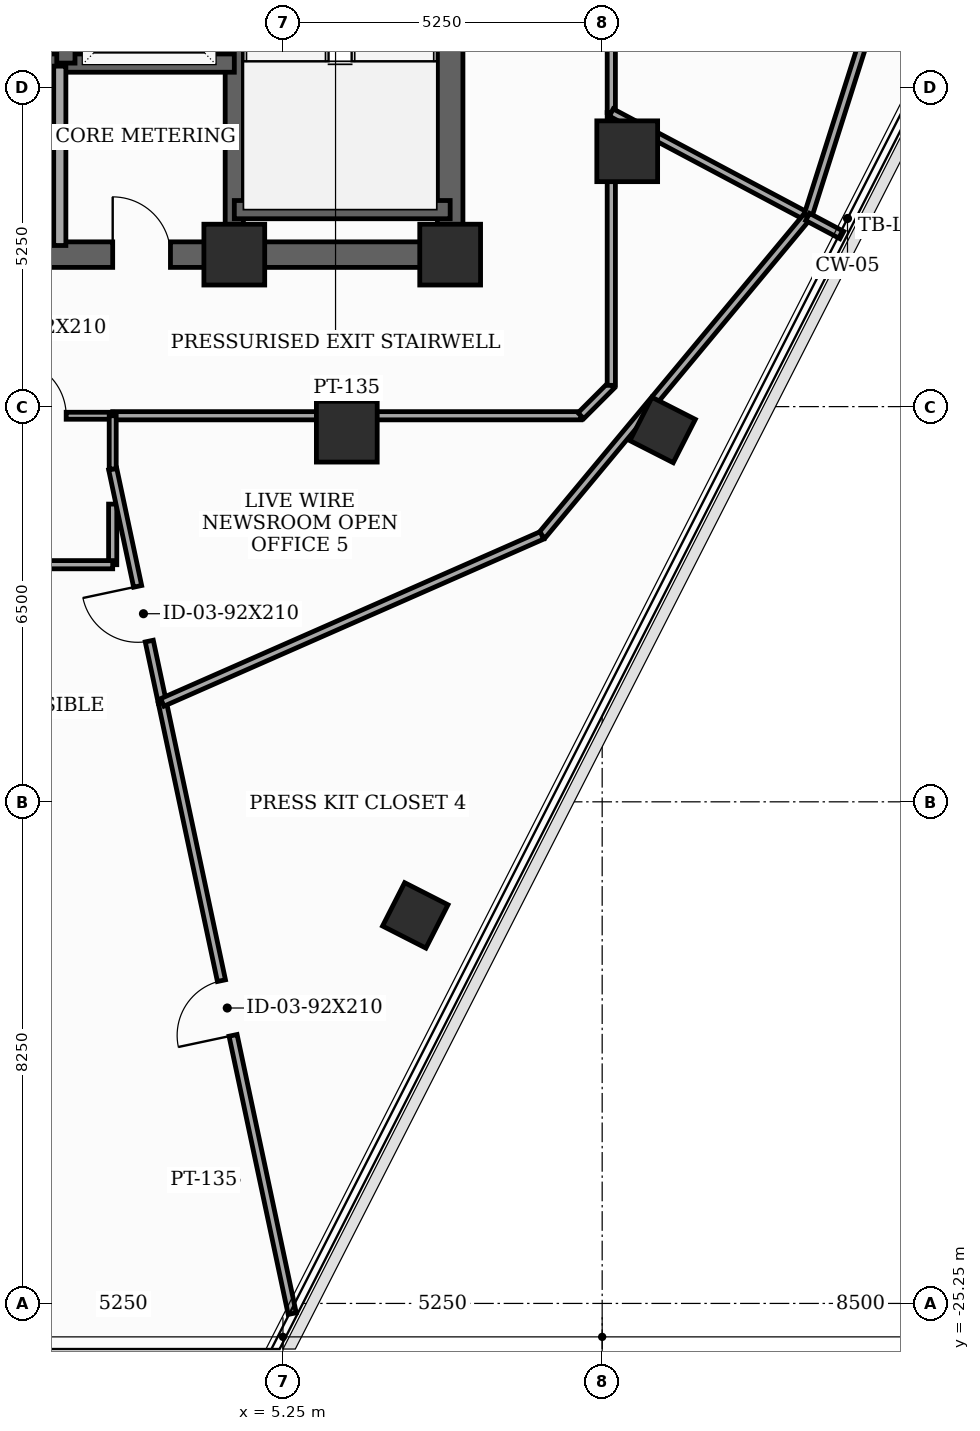
"""IFC4 building model, lengths in metres.
Left out: names, types, materials, properties, quantities, classifications, styles, units other than length and angle.
Written with IfcOpenShell. Run it as: python <this file> out.ifc"""

import sys

from ifc_helpers import new_model, si_unit, direction, frame, frame_2d, origin, origin_2d, place, context, subcontext, project, spatial, rectangle, extrude, element, fill, save


model = new_model("IFC4")
c1 = context("Model", 3, precision=1e-05, world=origin(), true_north=direction((0.0, 1.0)))
c2 = subcontext(c1, "Body", "Model", "MODEL_VIEW")
j1 = project(units=[si_unit("LENGTHUNIT", "METRE"), si_unit("PLANEANGLEUNIT", "RADIAN")], contexts=[c1])
p1 = place(None, origin())
s1 = spatial("IfcSite", under=j1, at=p1, CompositionType="ELEMENT")
p2 = place(p1, origin())
s2 = spatial("IfcBuilding", under=s1, at=p2, CompositionType="ELEMENT")
p3 = place(p2, frame((0.0, 0.0, 267.0)))
s3 = spatial("IfcBuildingStorey", under=s2, at=p3, CompositionType="ELEMENT", Elevation=267.0)
for number, where, z_axis, x_axis in (
    (1, (4.45, -8.0, 0.0), (0.0, 0.0, 1.0), (1.0, 0.0, 0.0)),
    (2, (8.0, -8.0, 0.0), (0.0, 0.0, 1.0), (1.0, 0.0, 0.0)),
    (3, (6.3, -10.912, 0.0), (0.0, 0.0, 1.0), (1.0, 0.0, 0.0)),
    (4, (10.912, -6.3, 0.0), (0.0, 0.0, 1.0), (1.0, 0.0, 0.0)),
):
    element("IfcColumn", number, at=place(p3, frame(where, z_axis=z_axis, x_axis=x_axis)), inside=s3, PredefinedType="COLUMN", context=c2, shape_type="SweptSolid", body=[
        extrude(rectangle(XDim=1.0, YDim=1.0, at=origin_2d()), origin(), (0.0, 0.0, 1.0), 3.7),
    ])
for number, where, z_axis, x_axis in (
    (5, (7.426, -18.868, 0.0), (0.0, 0.0, 1.0), (0.454, 0.891, 0.0)),
    (6, (11.494, -10.885, 0.0), (0.0, 0.0, 1.0), (0.454, 0.891, 0.0)),
):
    element("IfcColumn", number, at=place(p3, frame(where, z_axis=z_axis, x_axis=x_axis)), inside=s3, PredefinedType="COLUMN", context=c2, shape_type="SweptSolid", body=[
        extrude(rectangle(XDim=0.8, YDim=0.8, at=origin_2d()), origin(), (0.0, 0.0, 1.0), 3.7),
    ])
p4 = place(p3, frame((8.0, -8.0, 0.0), z_axis=(0.0, 0.0, 1.0), x_axis=(0.0, 1.0, 0.0)))
e7 = element("IfcWall", 7, at=p4, inside=s3, PredefinedType="SHEAR", context=c2, shape_type="SweptSolid", body=[
    extrude(rectangle(XDim=16.0, YDim=0.42, at=frame_2d((8.0, 0.0))), origin(), (0.0, 0.0, 1.0), 3.5),
])
p5 = place(p4, frame((9.6, 0.0, 0.0)))
e8 = element("IfcOpeningElement", 8, at=p5, cuts=e7, PredefinedType="OPENING", context=c2, shape_type="SweptSolid", body=[
    extrude(rectangle(XDim=1.05, YDim=2.15, at=frame_2d((0.525, 1.075))), frame((0.0, 0.22, 0.0), z_axis=(0.0, -1.0, 0.0), x_axis=(1.0, 0.0, 0.0)), (0.0, 0.0, 1.0), 0.44),
])
p6 = place(p4, frame((14.469, 0.0, 0.0)))
e9 = element("IfcOpeningElement", 9, at=p6, cuts=e7, PredefinedType="OPENING", context=c2, shape_type="SweptSolid", body=[
    extrude(rectangle(XDim=0.85, YDim=2.02, at=frame_2d((0.425, 1.01))), frame((0.0, 0.22, 0.0), z_axis=(0.0, -1.0, 0.0), x_axis=(1.0, 0.0, 0.0)), (0.0, 0.0, 1.0), 0.44),
])
p7 = place(p3, frame((-8.0, -8.0, 0.0), z_axis=(0.0, 0.0, 1.0), x_axis=(1.0, 0.0, 0.0)))
e10 = element("IfcWall", 10, at=p7, inside=s3, PredefinedType="SHEAR", context=c2, shape_type="SweptSolid", body=[
    extrude(rectangle(XDim=16.0, YDim=0.42, at=frame_2d((8.0, 0.0))), origin(), (0.0, 0.0, 1.0), 3.5),
])
p8 = place(p7, frame((4.6, 0.0, 0.0)))
e11 = element("IfcOpeningElement", 11, at=p8, cuts=e10, PredefinedType="OPENING", context=c2, shape_type="SweptSolid", body=[
    extrude(rectangle(XDim=0.95, YDim=2.1, at=frame_2d((0.475, 1.05))), frame((0.0, 0.22, 0.0), z_axis=(0.0, -1.0, 0.0), x_axis=(1.0, 0.0, 0.0)), (0.0, 0.0, 1.0), 0.44),
])
p9 = place(p7, frame((7.52, 0.0, 0.0)))
e12 = element("IfcOpeningElement", 12, at=p9, cuts=e10, PredefinedType="OPENING", context=c2, shape_type="SweptSolid", body=[
    extrude(rectangle(XDim=0.95, YDim=2.1, at=frame_2d((0.475, 1.05))), frame((0.0, 0.22, 0.0), z_axis=(0.0, -1.0, 0.0), x_axis=(1.0, 0.0, 0.0)), (0.0, 0.0, 1.0), 0.44),
])
p10 = place(p7, frame((10.45, 0.0, 0.0)))
e13 = element("IfcOpeningElement", 13, at=p10, cuts=e10, PredefinedType="OPENING", context=c2, shape_type="SweptSolid", body=[
    extrude(rectangle(XDim=0.95, YDim=2.1, at=frame_2d((0.475, 1.05))), frame((0.0, 0.22, 0.0), z_axis=(0.0, -1.0, 0.0), x_axis=(1.0, 0.0, 0.0)), (0.0, 0.0, 1.0), 0.44),
])
p11 = place(p3, frame((4.45, -7.79, 0.0), z_axis=(0.0, 0.0, 1.0), x_axis=(0.0, 1.0, 0.0)))
e14 = element("IfcWall", 14, at=p11, inside=s3, PredefinedType="SHEAR", context=c2, shape_type="SweptSolid", body=[
    extrude(rectangle(XDim=15.58, YDim=0.3, at=frame_2d((7.79, 0.0))), origin(), (0.0, 0.0, 1.0), 3.5),
])
p12 = place(p3, frame((4.45, -7.26, 0.0), z_axis=(0.0, 0.0, 1.0), x_axis=(1.0, 0.0, 0.0)))
e15 = element("IfcWall", 15, at=p12, inside=s3, PredefinedType="SHEAR", context=c2, shape_type="SweptSolid", body=[
    extrude(rectangle(XDim=3.55, YDim=0.3, at=frame_2d((1.775, 0.0))), origin(), (0.0, 0.0, 1.0), 3.5),
])
p13 = place(p3, frame((-4.45, -4.85, 0.0), z_axis=(0.0, 0.0, 1.0), x_axis=(1.0, 0.0, 0.0)))
e16 = element("IfcWall", 16, at=p13, inside=s3, PredefinedType="SHEAR", context=c2, shape_type="SweptSolid", body=[
    extrude(rectangle(XDim=8.9, YDim=0.3, at=frame_2d((4.45, 0.0))), origin(), (0.0, 0.0, 1.0), 3.5),
])
p14 = place(p3, frame((1.68, -4.85, 0.0), z_axis=(0.0, 0.0, 1.0), x_axis=(0.0, 1.0, 0.0)))
e17 = element("IfcWall", 17, at=p14, inside=s3, PredefinedType="SHEAR", context=c2, shape_type="SweptSolid", body=[
    extrude(rectangle(XDim=12.64, YDim=0.3, at=frame_2d((6.32, 0.0))), origin(), (0.0, 0.0, 1.0), 3.5),
])
p15 = place(p14, frame((0.55, 0.0, 0.0)))
e18 = element("IfcOpeningElement", 18, at=p15, cuts=e17, PredefinedType="OPENING", context=c2, shape_type="SweptSolid", body=[
    extrude(rectangle(XDim=1.1, YDim=2.1, at=frame_2d((0.55, 1.05))), frame((0.0, 0.16, 0.0), z_axis=(0.0, -1.0, 0.0), x_axis=(1.0, 0.0, 0.0)), (0.0, 0.0, 1.0), 0.32),
])
p16 = place(p14, frame((2.65, 0.0, 0.0)))
e19 = element("IfcOpeningElement", 19, at=p16, cuts=e17, PredefinedType="OPENING", context=c2, shape_type="SweptSolid", body=[
    extrude(rectangle(XDim=1.1, YDim=2.1, at=frame_2d((0.55, 1.05))), frame((0.0, 0.16, 0.0), z_axis=(0.0, -1.0, 0.0), x_axis=(1.0, 0.0, 0.0)), (0.0, 0.0, 1.0), 0.32),
])
p17 = place(p14, frame((4.75, 0.0, 0.0)))
e20 = element("IfcOpeningElement", 20, at=p17, cuts=e17, PredefinedType="OPENING", context=c2, shape_type="SweptSolid", body=[
    extrude(rectangle(XDim=1.1, YDim=2.1, at=frame_2d((0.55, 1.05))), frame((0.0, 0.16, 0.0), z_axis=(0.0, -1.0, 0.0), x_axis=(1.0, 0.0, 0.0)), (0.0, 0.0, 1.0), 0.32),
])
p18 = place(p14, frame((8.9, 0.0, 0.0)))
e21 = element("IfcOpeningElement", 21, at=p18, cuts=e17, PredefinedType="OPENING", context=c2, shape_type="SweptSolid", body=[
    extrude(rectangle(XDim=0.95, YDim=2.1, at=frame_2d((0.475, 1.05))), frame((0.0, 0.16, 0.0), z_axis=(0.0, -1.0, 0.0), x_axis=(1.0, 0.0, 0.0)), (0.0, 0.0, 1.0), 0.32),
])
p19 = place(p3, frame((1.58, -7.85, 0.0), z_axis=(0.0, 0.0, 1.0), x_axis=(0.0, 1.0, 0.0)))
e22 = element("IfcWall", 22, at=p19, inside=s3, PredefinedType="SOLIDWALL", context=c2, shape_type="SweptSolid", body=[
    extrude(rectangle(XDim=2.95, YDim=0.2, at=frame_2d((1.475, 0.0))), origin(), (0.0, 0.0, 1.0), 2.885),
])
p20 = place(p3, frame((10.65, -5.663, 0.0), z_axis=(0.0, 0.0, 1.0), x_axis=(0.0, 1.0, 0.0)))
e23 = element("IfcWall", 23, at=p20, inside=s3, PredefinedType="PARTITIONING", context=c2, shape_type="SweptSolid", body=[
    extrude(rectangle(XDim=7.145, YDim=0.135, at=frame_2d((3.573, 0.0))), origin(), (0.0, 0.0, 1.0), 2.885),
])
p21 = place(p20, frame((3.097, 0.0, 0.0)))
e24 = element("IfcOpeningElement", 24, at=p21, cuts=e23, PredefinedType="OPENING", context=c2, shape_type="SweptSolid", body=[
    extrude(rectangle(XDim=0.95, YDim=2.1, at=frame_2d((0.475, 1.05))), frame((0.0, 0.077, 0.0), z_axis=(0.0, -1.0, 0.0), x_axis=(1.0, 0.0, 0.0)), (0.0, 0.0, 1.0), 0.155),
])
p22 = place(p3, frame((0.0, -10.65, 0.0), z_axis=(0.0, 0.0, 1.0), x_axis=(1.0, 0.0, 0.0)))
e25 = element("IfcWall", 25, at=p22, inside=s3, PredefinedType="PARTITIONING", context=c2, shape_type="SweptSolid", body=[
    extrude(rectangle(XDim=2.45, YDim=0.115, at=frame_2d((1.225, 0.0))), origin(), (0.0, 0.0, 1.0), 3.5),
])
p23 = place(p22, frame((0.765, 0.0, 0.0)))
e26 = element("IfcOpeningElement", 26, at=p23, cuts=e25, PredefinedType="OPENING", context=c2, shape_type="SweptSolid", body=[
    extrude(rectangle(XDim=0.92, YDim=2.1, at=frame_2d((0.46, 1.05))), frame((0.0, 0.067, 0.0), z_axis=(0.0, -1.0, 0.0), x_axis=(1.0, 0.0, 0.0)), (0.0, 0.0, 1.0), 0.135),
])
p24 = place(p3, frame((2.45, -10.65, 0.0), z_axis=(0.0, 0.0, 1.0), x_axis=(1.0, 0.0, 0.0)))
e27 = element("IfcWall", 27, at=p24, inside=s3, PredefinedType="PARTITIONING", context=c2, shape_type="SweptSolid", body=[
    extrude(rectangle(XDim=7.7, YDim=0.135, at=frame_2d((3.85, 0.0))), origin(), (0.0, 0.0, 1.0), 2.885),
])
p25 = place(p3, frame((10.15, -10.65, 0.0), z_axis=(0.0, 0.0, 1.0), x_axis=(0.707106781187, 0.707106781187, 0.0)))
e28 = element("IfcWall", 28, at=p25, inside=s3, PredefinedType="PARTITIONING", context=c2, shape_type="SweptSolid", body=[
    extrude(rectangle(XDim=0.707, YDim=0.135, at=frame_2d((0.354, 0.0))), origin(), (0.0, 0.0, 1.0), 3.5),
])
p26 = place(p3, frame((10.65, -10.15, 0.0), z_axis=(0.0, 0.0, 1.0), x_axis=(0.0, 1.0, 0.0)))
e29 = element("IfcWall", 29, at=p26, inside=s3, PredefinedType="PARTITIONING", context=c2, shape_type="SweptSolid", body=[
    extrude(rectangle(XDim=4.487, YDim=0.135, at=frame_2d((2.243, 0.0))), origin(), (0.0, 0.0, 1.0), 2.885),
])
p27 = place(p3, frame((10.65, -5.663, 0.0), z_axis=(0.0, 0.0, 1.0), x_axis=(0.882982204984, -0.469406461057, 0.0)))
e30 = element("IfcWall", 30, at=p27, inside=s3, PredefinedType="PARTITIONING", context=c2, shape_type="SweptSolid", body=[
    extrude(rectangle(XDim=3.647, YDim=0.135, at=frame_2d((1.823, 0.0))), origin(), (0.0, 0.0, 1.0), 2.885),
])
p28 = place(p3, frame((13.887, -7.354, 0.0), z_axis=(0.0, 0.0, 1.0), x_axis=(0.302867480059, 0.953032680197, 0.0)))
e31 = element("IfcWall", 31, at=p28, inside=s3, PredefinedType="PARTITIONING", context=c2, shape_type="SweptSolid", body=[
    extrude(rectangle(XDim=6.055, YDim=0.135, at=frame_2d((3.028, 0.0))), origin(), (0.0, 0.0, 1.0), 3.035),
])
p29 = place(p3, frame((2.45, -12.103, 0.0), z_axis=(0.0, 0.0, 1.0), x_axis=(0.0, -1.0, 0.0)))
e32 = element("IfcWall", 32, at=p29, inside=s3, PredefinedType="PARTITIONING", context=c2, shape_type="SweptSolid", body=[
    extrude(rectangle(XDim=0.997, YDim=0.135, at=frame_2d((0.499, 0.0))), origin(), (0.0, 0.0, 1.0), 2.885),
])
p30 = place(p3, frame((2.45, -13.1, 0.0), z_axis=(0.0, 0.0, 1.0), x_axis=(-1.0, 0.0, 0.0)))
e33 = element("IfcWall", 33, at=p30, inside=s3, PredefinedType="PARTITIONING", context=c2, shape_type="SweptSolid", body=[
    extrude(rectangle(XDim=2.45, YDim=0.135, at=frame_2d((1.225, 0.0))), origin(), (0.0, 0.0, 1.0), 3.5),
])
p31 = place(p3, frame((5.402, -25.417, 0.0), z_axis=(0.0, 0.0, 1.0), x_axis=(-0.207847958891, 0.978161145203, 0.0)))
e34 = element("IfcWall", 34, at=p31, inside=s3, PredefinedType="PARTITIONING", context=c2, shape_type="SweptSolid", body=[
    extrude(rectangle(XDim=10.277, YDim=0.135, at=frame_2d((5.138, 0.0))), origin(), (0.0, 0.0, 1.0), 3.035),
])
p32 = place(p31, frame((4.678, 0.0, 0.0)))
e35 = element("IfcOpeningElement", 35, at=p32, cuts=e34, PredefinedType="OPENING", context=c2, shape_type="SweptSolid", body=[
    extrude(rectangle(XDim=0.92, YDim=2.1, at=frame_2d((0.46, 1.05))), frame((0.0, 0.077, 0.0), z_axis=(0.0, -1.0, 0.0), x_axis=(1.0, 0.0, 0.0)), (0.0, 0.0, 1.0), 0.155),
])
p33 = place(p3, frame((3.266, -15.365, 0.0), z_axis=(0.0, 0.0, 1.0), x_axis=(-0.207944308429, 0.978140667078, 0.0)))
e36 = element("IfcWall", 36, at=p33, inside=s3, PredefinedType="PARTITIONING", context=c2, shape_type="SweptSolid", body=[
    extrude(rectangle(XDim=3.925, YDim=0.135, at=frame_2d((1.962, 0.0))), origin(), (0.0, 0.0, 1.0), 2.885),
])
p34 = place(p33, frame((1.031, 0.0, 0.0)))
e37 = element("IfcOpeningElement", 37, at=p34, cuts=e36, PredefinedType="OPENING", context=c2, shape_type="SweptSolid", body=[
    extrude(rectangle(XDim=0.92, YDim=2.1, at=frame_2d((0.46, 1.05))), frame((0.0, 0.077, 0.0), z_axis=(0.0, -1.0, 0.0), x_axis=(1.0, 0.0, 0.0)), (0.0, 0.0, 1.0), 0.155),
])
p35 = place(p3, frame((2.45, -11.526, 0.0), z_axis=(0.0, 0.0, 1.0), x_axis=(0.0, 1.0, 0.0)))
e38 = element("IfcWall", 38, at=p35, inside=s3, PredefinedType="PARTITIONING", context=c2, shape_type="SweptSolid", body=[
    extrude(rectangle(XDim=0.876, YDim=0.115, at=frame_2d((0.438, 0.0))), origin(), (0.0, 0.0, 1.0), 3.5),
])
p36 = place(p3, frame((13.87, -7.375, 0.0), z_axis=(0.0, 0.0, 1.0), x_axis=(-0.63949044568, -0.768799043888, 0.0)))
e39 = element("IfcWall", 39, at=p36, inside=s3, PredefinedType="PARTITIONING", context=c2, shape_type="SweptSolid", body=[
    extrude(rectangle(XDim=6.82, YDim=0.135, at=frame_2d((3.41, 0.0))), origin(), (0.0, 0.0, 1.0), 3.035),
])
p37 = place(p3, frame((9.509, -12.618, 0.0), z_axis=(0.0, 0.0, 1.0), x_axis=(-0.915305003879, -0.402761405641, 0.0)))
e40 = element("IfcWall", 40, at=p37, inside=s3, PredefinedType="PARTITIONING", context=c2, shape_type="SweptSolid", body=[
    extrude(rectangle(XDim=6.821, YDim=0.135, at=frame_2d((3.41, 0.0))), origin(), (0.0, 0.0, 1.0), 3.035),
])
p38 = place(p3, frame((14.441, -7.678, 0.0), z_axis=(0.0, 0.0, 1.0), x_axis=(-0.883423592085, 0.468575241501, 0.0)))
e41 = element("IfcWall", 41, at=p38, inside=s3, PredefinedType="PARTITIONING", context=c2, shape_type="SweptSolid", body=[
    extrude(rectangle(XDim=0.636, YDim=0.135, at=frame_2d((0.318, 0.0))), origin(), (0.0, 0.0, 1.0), 3.5),
])
p39 = place(p10, origin())
e42 = element("IfcDoor", 42, at=p39, inside=s3, OperationType="SINGLE_SWING_LEFT", PredefinedType="DOOR", context=c2, shape_type="SweptSolid", body=[
    extrude(rectangle(XDim=0.95, YDim=2.1, at=frame_2d((0.475, 1.05))), frame((0.0, 0.025, 0.0), z_axis=(0.0, -1.0, 0.0), x_axis=(1.0, 0.0, 0.0)), (0.0, 0.0, 1.0), 0.05),
])
fill(e13, e42)
p40 = place(p23, origin())
e43 = element("IfcDoor", 43, at=p40, inside=s3, OperationType="SINGLE_SWING_LEFT", PredefinedType="DOOR", context=c2, shape_type="SweptSolid", body=[
    extrude(rectangle(XDim=0.92, YDim=2.1, at=frame_2d((0.46, 1.05))), frame((0.0, 0.025, 0.0), z_axis=(0.0, -1.0, 0.0), x_axis=(1.0, 0.0, 0.0)), (0.0, 0.0, 1.0), 0.05),
])
fill(e26, e43)
p41 = place(p32, origin())
e44 = element("IfcDoor", 44, at=p41, inside=s3, OperationType="SINGLE_SWING_LEFT", PredefinedType="DOOR", context=c2, shape_type="SweptSolid", body=[
    extrude(rectangle(XDim=0.92, YDim=2.1, at=frame_2d((0.46, 1.05))), frame((0.0, 0.025, 0.0), z_axis=(0.0, -1.0, 0.0), x_axis=(1.0, 0.0, 0.0)), (0.0, 0.0, 1.0), 0.05),
])
fill(e35, e44)
p42 = place(p34, origin())
e45 = element("IfcDoor", 45, at=p42, inside=s3, OperationType="SINGLE_SWING_RIGHT", PredefinedType="DOOR", context=c2, shape_type="SweptSolid", body=[
    extrude(rectangle(XDim=0.92, YDim=2.1, at=frame_2d((0.46, 1.05))), frame((0.0, 0.025, 0.0), z_axis=(0.0, -1.0, 0.0), x_axis=(1.0, 0.0, 0.0)), (0.0, 0.0, 1.0), 0.05),
])
fill(e37, e45)
save(model, sys.argv[1])
